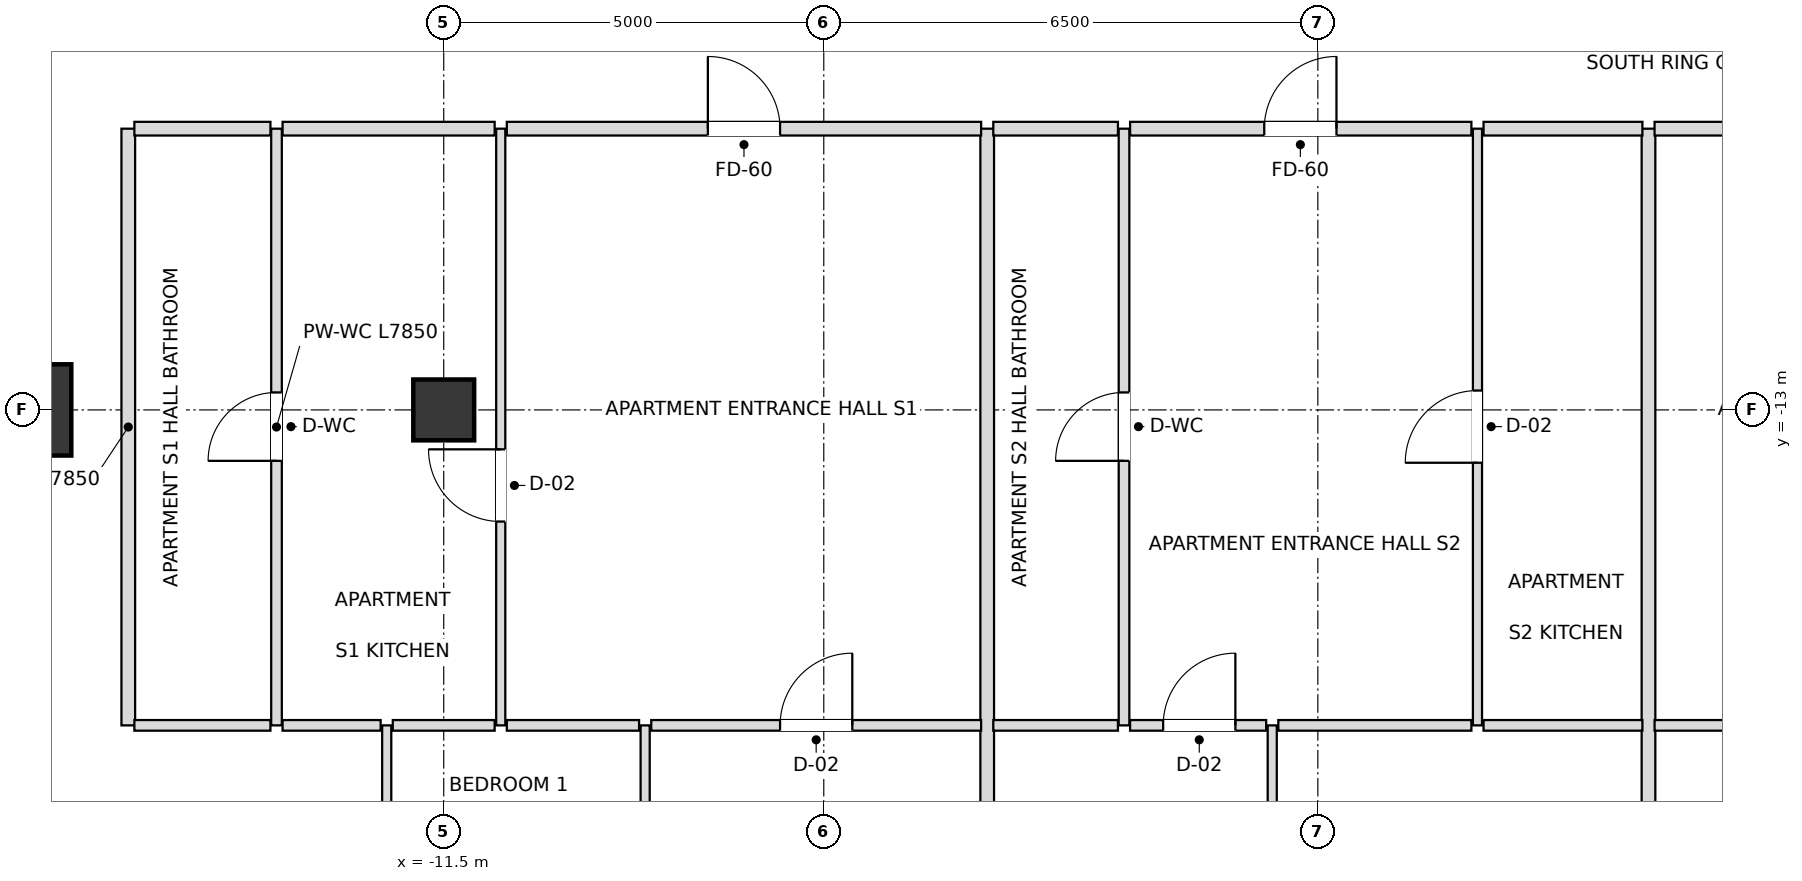
"""IFC4 building model, lengths in metres.
Left out: names, types, materials, properties, quantities, classifications, styles, units other than length and angle.
Written with IfcOpenShell. Run it as: python <this file> out.ifc"""

import sys

from ifc_helpers import new_model, si_unit, direction, frame, frame_2d, origin, origin_2d, place, context, subcontext, project, spatial, rectangle, extrude, element, fill, save


model = new_model("IFC4")
c1 = context("Model", 3, precision=1e-05, world=origin(), true_north=direction((0.0, 1.0)))
c2 = subcontext(c1, "Body", "Model", "MODEL_VIEW")
j1 = project(units=[si_unit("LENGTHUNIT", "METRE"), si_unit("PLANEANGLEUNIT", "RADIAN")], contexts=[c1])
p1 = place(None, origin())
s1 = spatial("IfcSite", under=j1, at=p1, CompositionType="ELEMENT")
p2 = place(p1, origin())
s2 = spatial("IfcBuilding", under=s1, at=p2, CompositionType="ELEMENT")
p3 = place(p2, frame((0.0, 0.0, 102.6)))
s3 = spatial("IfcBuildingStorey", under=s2, at=p3, CompositionType="ELEMENT", Elevation=102.6)
p4 = place(p3, frame((-17.0, -13.0, 0.0), z_axis=(0.0, 0.0, 1.0), x_axis=(1.0, 0.0, 0.0)))
e1 = element("IfcColumn", 1, at=p4, inside=s3, PredefinedType="USERDEFINED", context=c2, shape_type="SweptSolid", body=[
    extrude(rectangle(XDim=1.2, YDim=1.2, at=origin_2d()), origin(), (0.0, 0.0, 1.0), 3.6),
])
p5 = place(p3, frame((-11.5, -13.0, 0.0), z_axis=(0.0, 0.0, 1.0), x_axis=(1.0, 0.0, 0.0)))
e2 = element("IfcColumn", 2, at=p5, inside=s3, PredefinedType="COLUMN", context=c2, shape_type="SweptSolid", body=[
    extrude(rectangle(XDim=0.8, YDim=0.8, at=origin_2d()), origin(), (0.0, 0.0, 1.0), 3.6),
])
p6 = place(p3, frame((-15.65, -17.15, 0.0), z_axis=(0.0, 0.0, 1.0), x_axis=(0.0, 1.0, 0.0)))
e3 = element("IfcWall", 3, at=p6, inside=s3, PredefinedType="PARTITIONING", context=c2, shape_type="SweptSolid", body=[
    extrude(rectangle(XDim=7.85, YDim=0.18, at=frame_2d((3.925, 0.0))), origin(), (0.0, 0.0, 1.0), 2.736),
])
p7 = place(p3, frame((-13.7, -17.15, 0.0), z_axis=(0.0, 0.0, 1.0), x_axis=(0.0, 1.0, 0.0)))
e4 = element("IfcWall", 4, at=p7, inside=s3, PredefinedType="PARTITIONING", context=c2, shape_type="SweptSolid", body=[
    extrude(rectangle(XDim=7.85, YDim=0.14, at=frame_2d((3.925, 0.0))), origin(), (0.0, 0.0, 1.0), 2.736),
])
p8 = place(p7, frame((3.48, 0.0, 0.0)))
e5 = element("IfcOpeningElement", 5, at=p8, cuts=e4, PredefinedType="OPENING", context=c2, shape_type="SweptSolid", body=[
    extrude(rectangle(XDim=0.9, YDim=2.1, at=frame_2d((0.45, 1.05))), frame((0.0, 0.08, 0.0), z_axis=(0.0, -1.0, 0.0), x_axis=(1.0, 0.0, 0.0)), (0.0, 0.0, 1.0), 0.16),
])
p9 = place(p3, frame((-12.25, -23.15, 0.0), z_axis=(0.0, 0.0, 1.0), x_axis=(0.0, 1.0, 0.0)))
e6 = element("IfcWall", 6, at=p9, inside=s3, PredefinedType="PARTITIONING", context=c2, shape_type="SweptSolid", body=[
    extrude(rectangle(XDim=6.0, YDim=0.12, at=frame_2d((3.0, 0.0))), origin(), (0.0, 0.0, 1.0), 2.736),
])
p10 = place(p9, frame((1.399, 0.0, 0.0)))
e7 = element("IfcOpeningElement", 7, at=p10, cuts=e6, PredefinedType="OPENING", context=c2, shape_type="SweptSolid", body=[
    extrude(rectangle(XDim=0.9, YDim=2.1, at=frame_2d((0.45, 1.05))), frame((0.0, 0.07, 0.0), z_axis=(0.0, -1.0, 0.0), x_axis=(1.0, 0.0, 0.0)), (0.0, 0.0, 1.0), 0.14),
])
p11 = place(p3, frame((-10.75, -17.15, 0.0), z_axis=(0.0, 0.0, 1.0), x_axis=(0.0, 1.0, 0.0)))
e8 = element("IfcWall", 8, at=p11, inside=s3, PredefinedType="PARTITIONING", context=c2, shape_type="SweptSolid", body=[
    extrude(rectangle(XDim=7.85, YDim=0.12, at=frame_2d((3.925, 0.0))), origin(), (0.0, 0.0, 1.0), 2.816),
])
p12 = place(p11, frame((2.681, 0.0, 0.0)))
e9 = element("IfcOpeningElement", 9, at=p12, cuts=e8, PredefinedType="OPENING", context=c2, shape_type="SweptSolid", body=[
    extrude(rectangle(XDim=0.95, YDim=2.1, at=frame_2d((0.475, 1.05))), frame((0.0, 0.07, 0.0), z_axis=(0.0, -1.0, 0.0), x_axis=(1.0, 0.0, 0.0)), (0.0, 0.0, 1.0), 0.14),
])
p13 = place(p3, frame((-8.85, -23.15, 0.0), z_axis=(0.0, 0.0, 1.0), x_axis=(0.0, 1.0, 0.0)))
e10 = element("IfcWall", 10, at=p13, inside=s3, PredefinedType="PARTITIONING", context=c2, shape_type="SweptSolid", body=[
    extrude(rectangle(XDim=6.0, YDim=0.12, at=frame_2d((3.0, 0.0))), origin(), (0.0, 0.0, 1.0), 2.816),
])
p14 = place(p13, frame((2.55, 0.0, 0.0)))
e11 = element("IfcOpeningElement", 11, at=p14, cuts=e10, PredefinedType="OPENING", context=c2, shape_type="SweptSolid", body=[
    extrude(rectangle(XDim=0.9, YDim=2.1, at=frame_2d((0.45, 1.05))), frame((0.0, 0.07, 0.0), z_axis=(0.0, -1.0, 0.0), x_axis=(1.0, 0.0, 0.0)), (0.0, 0.0, 1.0), 0.14),
])
p15 = place(p3, frame((-4.35, -23.15, 0.0), z_axis=(0.0, 0.0, 1.0), x_axis=(0.0, 1.0, 0.0)))
e12 = element("IfcWall", 12, at=p15, inside=s3, PredefinedType="PARTITIONING", context=c2, shape_type="SweptSolid", body=[
    extrude(rectangle(XDim=13.85, YDim=0.18, at=frame_2d((6.925, 0.0))), origin(), (0.0, 0.0, 1.0), 2.816),
])
p16 = place(p3, frame((-2.55, -17.15, 0.0), z_axis=(0.0, 0.0, 1.0), x_axis=(0.0, 1.0, 0.0)))
e13 = element("IfcWall", 13, at=p16, inside=s3, PredefinedType="PARTITIONING", context=c2, shape_type="SweptSolid", body=[
    extrude(rectangle(XDim=7.85, YDim=0.14, at=frame_2d((3.925, 0.0))), origin(), (0.0, 0.0, 1.0), 3.38),
])
p17 = place(p16, frame((3.48, 0.0, 0.0)))
e14 = element("IfcOpeningElement", 14, at=p17, cuts=e13, PredefinedType="OPENING", context=c2, shape_type="SweptSolid", body=[
    extrude(rectangle(XDim=0.9, YDim=2.1, at=frame_2d((0.45, 1.05))), frame((0.0, 0.08, 0.0), z_axis=(0.0, -1.0, 0.0), x_axis=(1.0, 0.0, 0.0)), (0.0, 0.0, 1.0), 0.16),
])
p18 = place(p3, frame((-0.6, -23.15, 0.0), z_axis=(0.0, 0.0, 1.0), x_axis=(0.0, 1.0, 0.0)))
e15 = element("IfcWall", 15, at=p18, inside=s3, PredefinedType="PARTITIONING", context=c2, shape_type="SweptSolid", body=[
    extrude(rectangle(XDim=6.0, YDim=0.12, at=frame_2d((3.0, 0.0))), origin(), (0.0, 0.0, 1.0), 2.816),
])
p19 = place(p18, frame((2.55, 0.0, 0.0)))
e16 = element("IfcOpeningElement", 16, at=p19, cuts=e15, PredefinedType="OPENING", context=c2, shape_type="SweptSolid", body=[
    extrude(rectangle(XDim=0.9, YDim=2.1, at=frame_2d((0.45, 1.05))), frame((0.0, 0.07, 0.0), z_axis=(0.0, -1.0, 0.0), x_axis=(1.0, 0.0, 0.0)), (0.0, 0.0, 1.0), 0.14),
])
p20 = place(p3, frame((2.1, -17.15, 0.0), z_axis=(0.0, 0.0, 1.0), x_axis=(0.0, 1.0, 0.0)))
e17 = element("IfcWall", 17, at=p20, inside=s3, PredefinedType="PARTITIONING", context=c2, shape_type="SweptSolid", body=[
    extrude(rectangle(XDim=7.85, YDim=0.12, at=frame_2d((3.925, 0.0))), origin(), (0.0, 0.0, 1.0), 3.38),
])
p21 = place(p20, frame((3.455, 0.0, 0.0)))
e18 = element("IfcOpeningElement", 18, at=p21, cuts=e17, PredefinedType="OPENING", context=c2, shape_type="SweptSolid", body=[
    extrude(rectangle(XDim=0.95, YDim=2.1, at=frame_2d((0.475, 1.05))), frame((0.0, 0.07, 0.0), z_axis=(0.0, -1.0, 0.0), x_axis=(1.0, 0.0, 0.0)), (0.0, 0.0, 1.0), 0.14),
])
p22 = place(p3, frame((4.35, -23.15, 0.0), z_axis=(0.0, 0.0, 1.0), x_axis=(0.0, 1.0, 0.0)))
e19 = element("IfcWall", 19, at=p22, inside=s3, PredefinedType="PARTITIONING", context=c2, shape_type="SweptSolid", body=[
    extrude(rectangle(XDim=13.85, YDim=0.18, at=frame_2d((6.925, 0.0))), origin(), (0.0, 0.0, 1.0), 2.816),
])
p23 = place(p3, frame((-15.57, -17.15, 0.0), z_axis=(0.0, 0.0, 1.0), x_axis=(1.0, 0.0, 0.0)))
e20 = element("IfcWall", 20, at=p23, inside=s3, PredefinedType="PARTITIONING", context=c2, shape_type="SweptSolid", body=[
    extrude(rectangle(XDim=1.79, YDim=0.14, at=frame_2d((0.895, 0.0))), origin(), (0.0, 0.0, 1.0), 2.736),
])
p24 = place(p3, frame((-13.62, -17.15, 0.0), z_axis=(0.0, 0.0, 1.0), x_axis=(1.0, 0.0, 0.0)))
e21 = element("IfcWall", 21, at=p24, inside=s3, PredefinedType="PARTITIONING", context=c2, shape_type="SweptSolid", body=[
    extrude(rectangle(XDim=1.29, YDim=0.14, at=frame_2d((0.645, 0.0))), origin(), (0.0, 0.0, 1.0), 2.736),
])
p25 = place(p3, frame((-12.17, -17.15, 0.0), z_axis=(0.0, 0.0, 1.0), x_axis=(1.0, 0.0, 0.0)))
e22 = element("IfcWall", 22, at=p25, inside=s3, PredefinedType="PARTITIONING", context=c2, shape_type="SweptSolid", body=[
    extrude(rectangle(XDim=1.34, YDim=0.14, at=frame_2d((0.67, 0.0))), origin(), (0.0, 0.0, 1.0), 2.736),
])
p26 = place(p3, frame((-10.67, -17.15, 0.0), z_axis=(0.0, 0.0, 1.0), x_axis=(1.0, 0.0, 0.0)))
e23 = element("IfcWall", 23, at=p26, inside=s3, PredefinedType="PARTITIONING", context=c2, shape_type="SweptSolid", body=[
    extrude(rectangle(XDim=1.74, YDim=0.14, at=frame_2d((0.87, 0.0))), origin(), (0.0, 0.0, 1.0), 3.38),
])
p27 = place(p3, frame((-8.77, -17.15, 0.0), z_axis=(0.0, 0.0, 1.0), x_axis=(1.0, 0.0, 0.0)))
e24 = element("IfcWall", 24, at=p27, inside=s3, PredefinedType="PARTITIONING", context=c2, shape_type="SweptSolid", body=[
    extrude(rectangle(XDim=4.34, YDim=0.14, at=frame_2d((2.17, 0.0))), origin(), (0.0, 0.0, 1.0), 2.816),
])
p28 = place(p27, frame((1.695, 0.0, 0.0)))
e25 = element("IfcOpeningElement", 25, at=p28, cuts=e24, PredefinedType="OPENING", context=c2, shape_type="SweptSolid", body=[
    extrude(rectangle(XDim=0.95, YDim=2.1, at=frame_2d((0.475, 1.05))), frame((0.0, 0.08, 0.0), z_axis=(0.0, -1.0, 0.0), x_axis=(1.0, 0.0, 0.0)), (0.0, 0.0, 1.0), 0.16),
])
p29 = place(p3, frame((-4.27, -17.15, 0.0), z_axis=(0.0, 0.0, 1.0), x_axis=(1.0, 0.0, 0.0)))
e26 = element("IfcWall", 26, at=p29, inside=s3, PredefinedType="PARTITIONING", context=c2, shape_type="SweptSolid", body=[
    extrude(rectangle(XDim=1.64, YDim=0.14, at=frame_2d((0.82, 0.0))), origin(), (0.0, 0.0, 1.0), 3.38),
])
p30 = place(p3, frame((-2.47, -17.15, 0.0), z_axis=(0.0, 0.0, 1.0), x_axis=(1.0, 0.0, 0.0)))
e27 = element("IfcWall", 27, at=p30, inside=s3, PredefinedType="PARTITIONING", context=c2, shape_type="SweptSolid", body=[
    extrude(rectangle(XDim=1.79, YDim=0.14, at=frame_2d((0.895, 0.0))), origin(), (0.0, 0.0, 1.0), 3.38),
])
p31 = place(p30, frame((0.435, 0.0, 0.0)))
e28 = element("IfcOpeningElement", 28, at=p31, cuts=e27, PredefinedType="OPENING", context=c2, shape_type="SweptSolid", body=[
    extrude(rectangle(XDim=0.95, YDim=2.1, at=frame_2d((0.475, 1.05))), frame((0.0, 0.08, 0.0), z_axis=(0.0, -1.0, 0.0), x_axis=(1.0, 0.0, 0.0)), (0.0, 0.0, 1.0), 0.16),
])
p32 = place(p3, frame((-0.52, -17.15, 0.0), z_axis=(0.0, 0.0, 1.0), x_axis=(1.0, 0.0, 0.0)))
e29 = element("IfcWall", 29, at=p32, inside=s3, PredefinedType="PARTITIONING", context=c2, shape_type="SweptSolid", body=[
    extrude(rectangle(XDim=2.54, YDim=0.14, at=frame_2d((1.27, 0.0))), origin(), (0.0, 0.0, 1.0), 3.38),
])
p33 = place(p3, frame((2.18, -17.15, 0.0), z_axis=(0.0, 0.0, 1.0), x_axis=(1.0, 0.0, 0.0)))
e30 = element("IfcWall", 30, at=p33, inside=s3, PredefinedType="PARTITIONING", context=c2, shape_type="SweptSolid", body=[
    extrude(rectangle(XDim=2.09, YDim=0.14, at=frame_2d((1.045, 0.0))), origin(), (0.0, 0.0, 1.0), 3.38),
])
p34 = place(p3, frame((4.43, -17.15, 0.0), z_axis=(0.0, 0.0, 1.0), x_axis=(1.0, 0.0, 0.0)))
e31 = element("IfcWall", 31, at=p34, inside=s3, PredefinedType="PARTITIONING", context=c2, shape_type="SweptSolid", body=[
    extrude(rectangle(XDim=4.34, YDim=0.14, at=frame_2d((2.17, 0.0))), origin(), (0.0, 0.0, 1.0), 2.816),
])
p35 = place(p34, frame((1.685, 0.0, 0.0)))
e32 = element("IfcOpeningElement", 32, at=p35, cuts=e31, PredefinedType="OPENING", context=c2, shape_type="SweptSolid", body=[
    extrude(rectangle(XDim=0.95, YDim=2.1, at=frame_2d((0.475, 1.05))), frame((0.0, 0.08, 0.0), z_axis=(0.0, -1.0, 0.0), x_axis=(1.0, 0.0, 0.0)), (0.0, 0.0, 1.0), 0.16),
])
p36 = place(p3, frame((-15.57, -9.3, 0.0), z_axis=(0.0, 0.0, 1.0), x_axis=(1.0, 0.0, 0.0)))
e33 = element("IfcWall", 33, at=p36, inside=s3, PredefinedType="PARTITIONING", context=c2, shape_type="SweptSolid", body=[
    extrude(rectangle(XDim=1.79, YDim=0.18, at=frame_2d((0.895, 0.0))), origin(), (0.0, 0.0, 1.0), 3.38),
])
p37 = place(p3, frame((-13.62, -9.3, 0.0), z_axis=(0.0, 0.0, 1.0), x_axis=(1.0, 0.0, 0.0)))
e34 = element("IfcWall", 34, at=p37, inside=s3, PredefinedType="PARTITIONING", context=c2, shape_type="SweptSolid", body=[
    extrude(rectangle(XDim=2.79, YDim=0.18, at=frame_2d((1.395, 0.0))), origin(), (0.0, 0.0, 1.0), 3.38),
])
p38 = place(p3, frame((-10.67, -9.3, 0.0), z_axis=(0.0, 0.0, 1.0), x_axis=(1.0, 0.0, 0.0)))
e35 = element("IfcWall", 35, at=p38, inside=s3, PredefinedType="PARTITIONING", context=c2, shape_type="SweptSolid", body=[
    extrude(rectangle(XDim=6.24, YDim=0.18, at=frame_2d((3.12, 0.0))), origin(), (0.0, 0.0, 1.0), 2.816),
])
p39 = place(p38, frame((2.645, 0.0, 0.0)))
e36 = element("IfcOpeningElement", 36, at=p39, cuts=e35, PredefinedType="OPENING", context=c2, shape_type="SweptSolid", body=[
    extrude(rectangle(XDim=0.95, YDim=2.15, at=frame_2d((0.475, 1.075))), frame((0.0, 0.1, 0.0), z_axis=(0.0, -1.0, 0.0), x_axis=(1.0, 0.0, 0.0)), (0.0, 0.0, 1.0), 0.2),
])
p40 = place(p3, frame((-4.27, -9.3, 0.0), z_axis=(0.0, 0.0, 1.0), x_axis=(1.0, 0.0, 0.0)))
e37 = element("IfcWall", 37, at=p40, inside=s3, PredefinedType="PARTITIONING", context=c2, shape_type="SweptSolid", body=[
    extrude(rectangle(XDim=1.64, YDim=0.18, at=frame_2d((0.82, 0.0))), origin(), (0.0, 0.0, 1.0), 3.38),
])
p41 = place(p3, frame((-2.47, -9.3, 0.0), z_axis=(0.0, 0.0, 1.0), x_axis=(1.0, 0.0, 0.0)))
e38 = element("IfcWall", 38, at=p41, inside=s3, PredefinedType="PARTITIONING", context=c2, shape_type="SweptSolid", body=[
    extrude(rectangle(XDim=4.49, YDim=0.18, at=frame_2d((2.245, 0.0))), origin(), (0.0, 0.0, 1.0), 3.38),
])
p42 = place(p41, frame((1.765, 0.0, 0.0)))
e39 = element("IfcOpeningElement", 39, at=p42, cuts=e38, PredefinedType="OPENING", context=c2, shape_type="SweptSolid", body=[
    extrude(rectangle(XDim=0.95, YDim=2.15, at=frame_2d((0.475, 1.075))), frame((0.0, 0.1, 0.0), z_axis=(0.0, -1.0, 0.0), x_axis=(1.0, 0.0, 0.0)), (0.0, 0.0, 1.0), 0.2),
])
p43 = place(p3, frame((2.18, -9.3, 0.0), z_axis=(0.0, 0.0, 1.0), x_axis=(1.0, 0.0, 0.0)))
e40 = element("IfcWall", 40, at=p43, inside=s3, PredefinedType="PARTITIONING", context=c2, shape_type="SweptSolid", body=[
    extrude(rectangle(XDim=2.09, YDim=0.18, at=frame_2d((1.045, 0.0))), origin(), (0.0, 0.0, 1.0), 3.38),
])
p44 = place(p3, frame((4.43, -9.3, 0.0), z_axis=(0.0, 0.0, 1.0), x_axis=(1.0, 0.0, 0.0)))
e41 = element("IfcWall", 41, at=p44, inside=s3, PredefinedType="PARTITIONING", context=c2, shape_type="SweptSolid", body=[
    extrude(rectangle(XDim=6.24, YDim=0.18, at=frame_2d((3.12, 0.0))), origin(), (0.0, 0.0, 1.0), 2.816),
])
p45 = place(p44, frame((2.635, 0.0, 0.0)))
e42 = element("IfcOpeningElement", 42, at=p45, cuts=e41, PredefinedType="OPENING", context=c2, shape_type="SweptSolid", body=[
    extrude(rectangle(XDim=0.95, YDim=2.15, at=frame_2d((0.475, 1.075))), frame((0.0, 0.1, 0.0), z_axis=(0.0, -1.0, 0.0), x_axis=(1.0, 0.0, 0.0)), (0.0, 0.0, 1.0), 0.2),
])
p46 = place(p39, origin())
e43 = element("IfcDoor", 43, at=p46, inside=s3, OperationType="SINGLE_SWING_LEFT", PredefinedType="DOOR", context=c2, shape_type="SweptSolid", body=[
    extrude(rectangle(XDim=0.95, YDim=2.15, at=frame_2d((0.475, 1.075))), frame((0.0, 0.025, 0.0), z_axis=(0.0, -1.0, 0.0), x_axis=(1.0, 0.0, 0.0)), (0.0, 0.0, 1.0), 0.05),
])
fill(e36, e43)
p47 = place(p12, origin())
e44 = element("IfcDoor", 44, at=p47, inside=s3, OperationType="SINGLE_SWING_RIGHT", PredefinedType="DOOR", context=c2, shape_type="SweptSolid", body=[
    extrude(rectangle(XDim=0.95, YDim=2.1, at=frame_2d((0.475, 1.05))), frame((0.0, 0.025, 0.0), z_axis=(0.0, -1.0, 0.0), x_axis=(1.0, 0.0, 0.0)), (0.0, 0.0, 1.0), 0.05),
])
fill(e9, e44)
p48 = place(p8, origin())
e45 = element("IfcDoor", 45, at=p48, inside=s3, OperationType="SINGLE_SWING_LEFT", PredefinedType="DOOR", context=c2, shape_type="SweptSolid", body=[
    extrude(rectangle(XDim=0.9, YDim=2.1, at=frame_2d((0.45, 1.05))), frame((0.0, 0.025, 0.0), z_axis=(0.0, -1.0, 0.0), x_axis=(1.0, 0.0, 0.0)), (0.0, 0.0, 1.0), 0.05),
])
fill(e5, e45)
p49 = place(p28, origin())
e46 = element("IfcDoor", 46, at=p49, inside=s3, OperationType="SINGLE_SWING_RIGHT", PredefinedType="DOOR", context=c2, shape_type="SweptSolid", body=[
    extrude(rectangle(XDim=0.95, YDim=2.1, at=frame_2d((0.475, 1.05))), frame((0.0, 0.025, 0.0), z_axis=(0.0, -1.0, 0.0), x_axis=(1.0, 0.0, 0.0)), (0.0, 0.0, 1.0), 0.05),
])
fill(e25, e46)
p50 = place(p17, origin())
e47 = element("IfcDoor", 47, at=p50, inside=s3, OperationType="SINGLE_SWING_LEFT", PredefinedType="DOOR", context=c2, shape_type="SweptSolid", body=[
    extrude(rectangle(XDim=0.9, YDim=2.1, at=frame_2d((0.45, 1.05))), frame((0.0, 0.025, 0.0), z_axis=(0.0, -1.0, 0.0), x_axis=(1.0, 0.0, 0.0)), (0.0, 0.0, 1.0), 0.05),
])
fill(e14, e47)
p51 = place(p42, origin())
e48 = element("IfcDoor", 48, at=p51, inside=s3, OperationType="SINGLE_SWING_RIGHT", PredefinedType="DOOR", context=c2, shape_type="SweptSolid", body=[
    extrude(rectangle(XDim=0.95, YDim=2.15, at=frame_2d((0.475, 1.075))), frame((0.0, 0.025, 0.0), z_axis=(0.0, -1.0, 0.0), x_axis=(1.0, 0.0, 0.0)), (0.0, 0.0, 1.0), 0.05),
])
fill(e39, e48)
p52 = place(p21, origin())
e49 = element("IfcDoor", 49, at=p52, inside=s3, OperationType="SINGLE_SWING_LEFT", PredefinedType="DOOR", context=c2, shape_type="SweptSolid", body=[
    extrude(rectangle(XDim=0.95, YDim=2.1, at=frame_2d((0.475, 1.05))), frame((0.0, 0.025, 0.0), z_axis=(0.0, -1.0, 0.0), x_axis=(1.0, 0.0, 0.0)), (0.0, 0.0, 1.0), 0.05),
])
fill(e18, e49)
p53 = place(p31, origin())
e50 = element("IfcDoor", 50, at=p53, inside=s3, OperationType="SINGLE_SWING_RIGHT", PredefinedType="DOOR", context=c2, shape_type="SweptSolid", body=[
    extrude(rectangle(XDim=0.95, YDim=2.1, at=frame_2d((0.475, 1.05))), frame((0.0, 0.025, 0.0), z_axis=(0.0, -1.0, 0.0), x_axis=(1.0, 0.0, 0.0)), (0.0, 0.0, 1.0), 0.05),
])
fill(e28, e50)
save(model, sys.argv[1])
